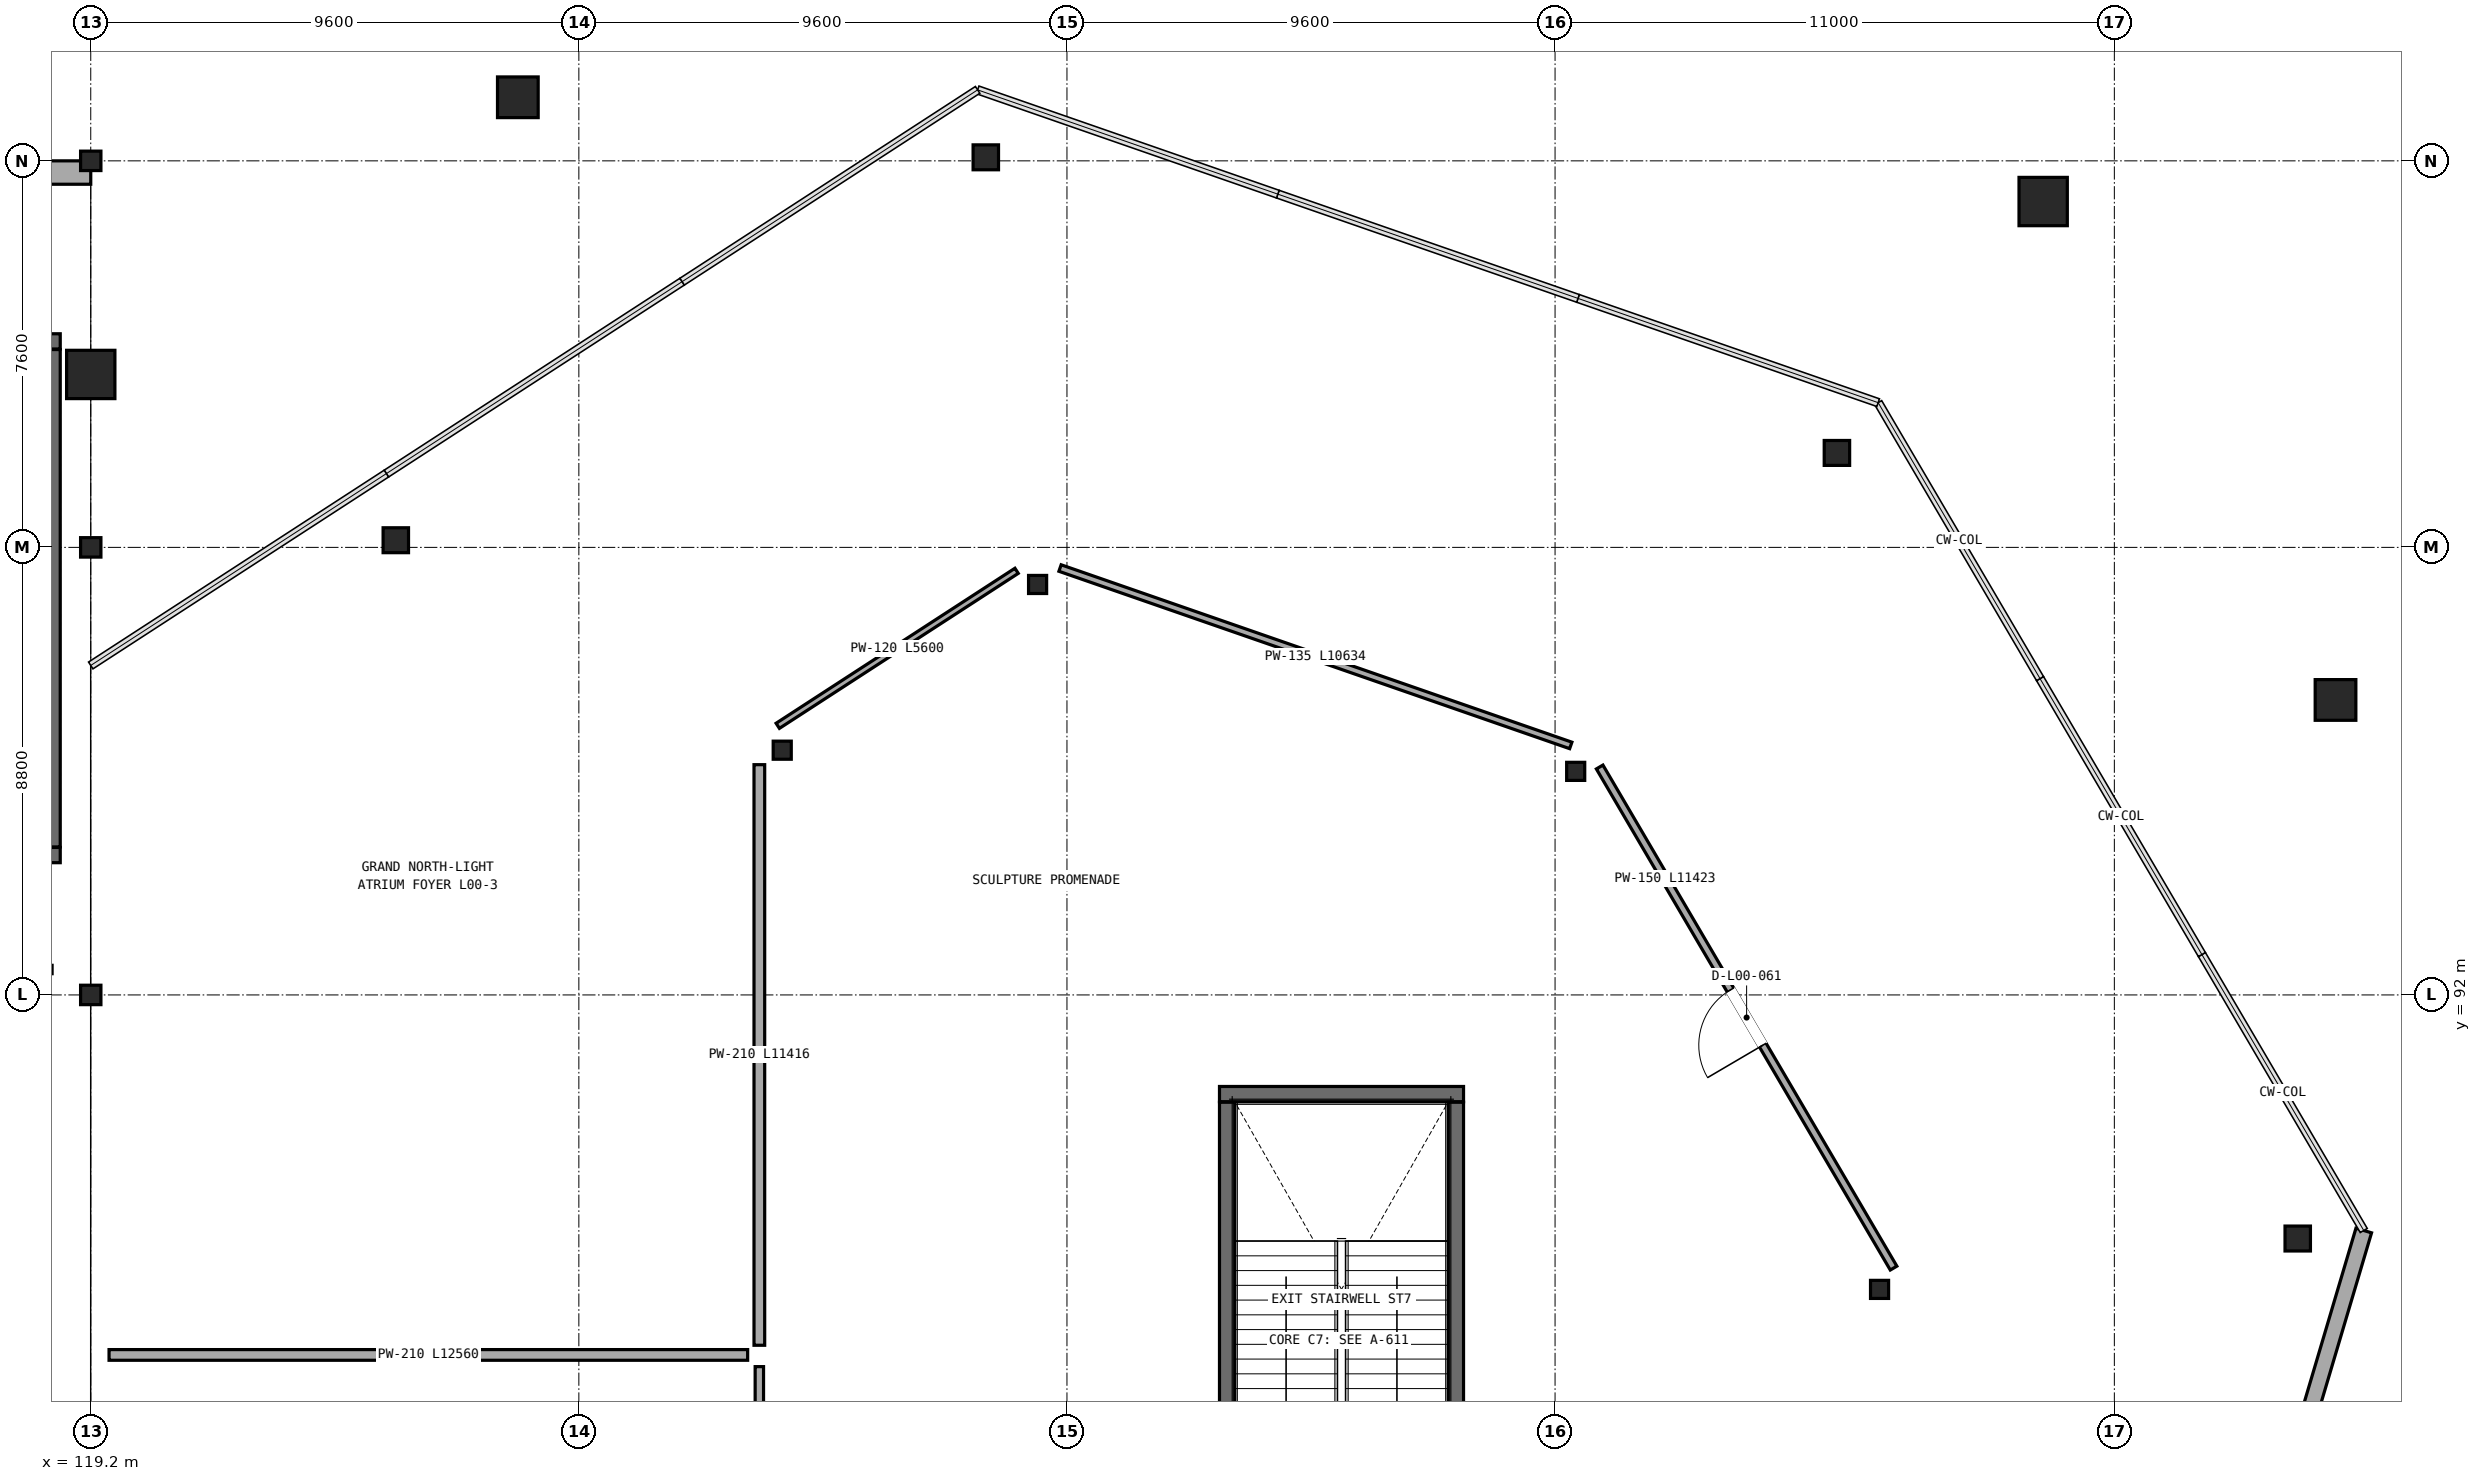
"""IFC4 building model, lengths in metres.
Left out: names, types, materials, properties, quantities, classifications, styles, units other than length and angle.
Written with IfcOpenShell. Run it as: python <this file> out.ifc"""

import sys

from ifc_helpers import new_model, si_unit, direction, frame, frame_2d, origin, origin_2d, place, context, subcontext, project, spatial, rectangle, circle, hollow_circle, i_section, extrude, element, fill, save


model = new_model("IFC4")
c1 = context("Model", 3, precision=1e-05, world=origin(), true_north=direction((0.0, 1.0)))
c2 = subcontext(c1, "Body", "Model", "MODEL_VIEW")
j1 = project(units=[si_unit("LENGTHUNIT", "METRE"), si_unit("PLANEANGLEUNIT", "RADIAN")], contexts=[c1])
p1 = place(None, origin())
s1 = spatial("IfcSite", under=j1, at=p1, CompositionType="ELEMENT")
p2 = place(p1, origin())
s2 = spatial("IfcBuilding", under=s1, at=p2, CompositionType="ELEMENT")
p3 = place(p2, origin())
s3 = spatial("IfcBuildingStorey", under=s2, at=p3, CompositionType="ELEMENT", Elevation=0.0)
for number, where, z_axis, x_axis in (
    (1, (119.2, 92.0, 0.0), (0.0, 0.0, 1.0), (1.0, 0.0, 0.0)),
    (2, (119.2, 100.8, 0.0), (0.0, 0.0, 1.0), (1.0, 0.0, 0.0)),
    (3, (119.2, 108.4, 0.0), (0.0, 0.0, 1.0), (1.0, 0.0, 0.0)),
):
    element("IfcColumn", number, at=place(p3, frame(where, z_axis=z_axis, x_axis=x_axis)), inside=s3, PredefinedType="COLUMN", context=c2, shape_type="SweptSolid", body=[
        extrude(i_section(OverallWidth=0.4, OverallDepth=0.382, WebThickness=0.025, FlangeThickness=0.036, at=origin_2d()), origin(), (0.0, 0.0, 1.0), 5.6),
    ])
p4 = place(p3, frame((163.35, 97.8, 0.0), z_axis=(0.0, 0.0, 1.0), x_axis=(1.0, 0.0, 0.0)))
e4 = element("IfcColumn", 4, at=p4, inside=s3, PredefinedType="COLUMN", context=c2, shape_type="SweptSolid", body=[
    extrude(circle(Radius=0.4, at=origin_2d()), origin(), (0.0, 0.0, 1.0), 5.56),
])
p5 = place(p3, frame((162.607, 87.21, 0.0), z_axis=(0.0, 0.0, 1.0), x_axis=(1.0, 0.0, 0.0)))
e5 = element("IfcColumn", 5, at=p5, inside=s3, PredefinedType="COLUMN", context=c2, shape_type="SweptSolid", body=[
    extrude(i_section(OverallWidth=0.5, OverallDepth=0.49, WebThickness=0.028, FlangeThickness=0.04, at=origin_2d()), origin(), (0.0, 0.0, 1.0), 5.6),
])
p6 = place(p3, frame((154.382, 86.21, 0.0), z_axis=(0.0, 0.0, 1.0), x_axis=(1.0, 0.0, 0.0)))
e6 = element("IfcColumn", 6, at=p6, inside=s3, PredefinedType="COLUMN", context=c2, shape_type="SweptSolid", body=[
    extrude(hollow_circle(Radius=0.178, WallThickness=0.013, at=origin_2d()), origin(), (0.0, 0.0, 1.0), 5.6),
])
p7 = place(p3, frame((157.6, 107.6, 0.0), z_axis=(0.0, 0.0, 1.0), x_axis=(1.0, 0.0, 0.0)))
e7 = element("IfcColumn", 7, at=p7, inside=s3, PredefinedType="COLUMN", context=c2, shape_type="SweptSolid", body=[
    extrude(circle(Radius=0.475, at=origin_2d()), origin(), (0.0, 0.0, 1.0), 5.56),
])
p8 = place(p3, frame((153.544, 102.657, 0.0), z_axis=(0.0, 0.0, 1.0), x_axis=(1.0, 0.0, 0.0)))
e8 = element("IfcColumn", 8, at=p8, inside=s3, PredefinedType="COLUMN", context=c2, shape_type="SweptSolid", body=[
    extrude(i_section(OverallWidth=0.5, OverallDepth=0.49, WebThickness=0.028, FlangeThickness=0.04, at=origin_2d()), origin(), (0.0, 0.0, 1.0), 5.6),
])
p9 = place(p3, frame((148.406, 96.396, 0.0), z_axis=(0.0, 0.0, 1.0), x_axis=(1.0, 0.0, 0.0)))
e9 = element("IfcColumn", 9, at=p9, inside=s3, PredefinedType="COLUMN", context=c2, shape_type="SweptSolid", body=[
    extrude(hollow_circle(Radius=0.178, WallThickness=0.013, at=origin_2d()), origin(), (0.0, 0.0, 1.0), 5.6),
])
p10 = place(p3, frame((127.6, 109.65, 0.0), z_axis=(0.0, 0.0, 1.0), x_axis=(1.0, 0.0, 0.0)))
e10 = element("IfcColumn", 10, at=p10, inside=s3, PredefinedType="COLUMN", context=c2, shape_type="SweptSolid", body=[
    extrude(circle(Radius=0.4, at=origin_2d()), origin(), (0.0, 0.0, 1.0), 5.56),
])
p11 = place(p3, frame((136.804, 108.469, 0.0), z_axis=(0.0, 0.0, 1.0), x_axis=(1.0, 0.0, 0.0)))
e11 = element("IfcColumn", 11, at=p11, inside=s3, PredefinedType="COLUMN", context=c2, shape_type="SweptSolid", body=[
    extrude(i_section(OverallWidth=0.5, OverallDepth=0.49, WebThickness=0.028, FlangeThickness=0.04, at=origin_2d()), origin(), (0.0, 0.0, 1.0), 5.6),
])
p12 = place(p3, frame((137.823, 100.071, 0.0), z_axis=(0.0, 0.0, 1.0), x_axis=(1.0, 0.0, 0.0)))
e12 = element("IfcColumn", 12, at=p12, inside=s3, PredefinedType="COLUMN", context=c2, shape_type="SweptSolid", body=[
    extrude(hollow_circle(Radius=0.178, WallThickness=0.013, at=origin_2d()), origin(), (0.0, 0.0, 1.0), 5.6),
])
p13 = place(p3, frame((119.2, 104.2, 0.0), z_axis=(0.0, 0.0, 1.0), x_axis=(1.0, 0.0, 0.0)))
e13 = element("IfcColumn", 13, at=p13, inside=s3, PredefinedType="COLUMN", context=c2, shape_type="SweptSolid", body=[
    extrude(circle(Radius=0.475, at=origin_2d()), origin(), (0.0, 0.0, 1.0), 5.56),
])
p14 = place(p3, frame((125.2, 100.941, 0.0), z_axis=(0.0, 0.0, 1.0), x_axis=(1.0, 0.0, 0.0)))
e14 = element("IfcColumn", 14, at=p14, inside=s3, PredefinedType="COLUMN", context=c2, shape_type="SweptSolid", body=[
    extrude(i_section(OverallWidth=0.5, OverallDepth=0.49, WebThickness=0.028, FlangeThickness=0.04, at=origin_2d()), origin(), (0.0, 0.0, 1.0), 5.6),
])
p15 = place(p3, frame((132.8, 96.812, 0.0), z_axis=(0.0, 0.0, 1.0), x_axis=(1.0, 0.0, 0.0)))
e15 = element("IfcColumn", 15, at=p15, inside=s3, PredefinedType="COLUMN", context=c2, shape_type="SweptSolid", body=[
    extrude(hollow_circle(Radius=0.178, WallThickness=0.013, at=origin_2d()), origin(), (0.0, 0.0, 1.0), 5.6),
])
p16 = place(p3, frame((159.394, 72.173, 0.0), z_axis=(0.0, 0.0, 1.0), x_axis=(0.284596961448, 0.958647260224, 0.0)))
e16 = element("IfcWall", 16, at=p16, inside=s3, PredefinedType="STANDARD", context=c2, shape_type="SweptSolid", body=[
    extrude(rectangle(XDim=15.851, YDim=0.32, at=frame_2d((7.926, 0.0))), origin(), (0.0, 0.0, 1.0), 5.29),
])
p17 = place(p16, frame((2.4, 0.0, 0.0)))
e17 = element("IfcOpeningElement", 17, at=p17, cuts=e16, PredefinedType="OPENING", context=c2, shape_type="SweptSolid", body=[
    extrude(rectangle(XDim=2.5, YDim=2.55, at=frame_2d((1.25, 1.275))), frame((0.0, 0.17, 0.0), z_axis=(0.0, -1.0, 0.0), x_axis=(1.0, 0.0, 0.0)), (0.0, 0.0, 1.0), 0.34),
])
p18 = place(p16, frame((9.2, 0.0, 0.0)))
e18 = element("IfcOpeningElement", 18, at=p18, cuts=e16, PredefinedType="OPENING", context=c2, shape_type="SweptSolid", body=[
    extrude(rectangle(XDim=2.5, YDim=2.55, at=frame_2d((1.25, 1.275))), frame((0.0, 0.17, 0.0), z_axis=(0.0, -1.0, 0.0), x_axis=(1.0, 0.0, 0.0)), (0.0, 0.0, 1.0), 0.34),
])
p19 = place(p3, frame((119.2, 108.17, 0.0), z_axis=(0.0, 0.0, 1.0), x_axis=(-1.0, 0.0, 0.0)))
e19 = element("IfcWall", 19, at=p19, inside=s3, PredefinedType="SOLIDWALL", context=c2, shape_type="SweptSolid", body=[
    extrude(rectangle(XDim=38.4, YDim=0.46, at=frame_2d((19.2, 0.0))), origin(), (0.0, 0.0, 1.0), 4.653),
])
p20 = place(p19, frame((32.375, 0.0, 0.0)))
e20 = element("IfcOpeningElement", 20, at=p20, cuts=e19, PredefinedType="OPENING", context=c2, shape_type="SweptSolid", body=[
    extrude(rectangle(XDim=2.45, YDim=2.5, at=frame_2d((1.225, 1.25))), frame((0.0, 0.24, 0.0), z_axis=(0.0, -1.0, 0.0), x_axis=(1.0, 0.0, 0.0)), (0.0, 0.0, 1.0), 0.48),
])
p21 = place(p19, frame((22.8, 0.0, 0.0)))
e21 = element("IfcOpeningElement", 21, at=p21, cuts=e19, PredefinedType="OPENING", context=c2, shape_type="SweptSolid", body=[
    extrude(rectangle(XDim=2.4, YDim=2.45, at=frame_2d((1.2, 1.225))), frame((0.0, 0.24, 0.0), z_axis=(0.0, -1.0, 0.0), x_axis=(1.0, 0.0, 0.0)), (0.0, 0.0, 1.0), 0.48),
])
p22 = place(p19, frame((13.25, 0.0, 0.0)))
e22 = element("IfcOpeningElement", 22, at=p22, cuts=e19, PredefinedType="OPENING", context=c2, shape_type="SweptSolid", body=[
    extrude(rectangle(XDim=2.3, YDim=2.4, at=frame_2d((1.15, 1.2))), frame((0.0, 0.24, 0.0), z_axis=(0.0, -1.0, 0.0), x_axis=(1.0, 0.0, 0.0)), (0.0, 0.0, 1.0), 0.48),
])
p23 = place(p19, frame((3.55, 0.0, 0.0)))
e23 = element("IfcOpeningElement", 23, at=p23, cuts=e19, PredefinedType="OPENING", context=c2, shape_type="SweptSolid", body=[
    extrude(rectangle(XDim=2.5, YDim=2.55, at=frame_2d((1.25, 1.275))), frame((0.0, 0.24, 0.0), z_axis=(0.0, -1.0, 0.0), x_axis=(1.0, 0.0, 0.0)), (0.0, 0.0, 1.0), 0.48),
])
p24 = place(p19, frame((20.2, 0.0, 0.9)))
e24 = element("IfcOpeningElement", 24, at=p24, cuts=e19, PredefinedType="OPENING", context=c2, shape_type="SweptSolid", body=[
    extrude(rectangle(XDim=1.52, YDim=1.55, at=frame_2d((0.76, 0.775))), frame((0.0, 0.24, 0.0), z_axis=(0.0, -1.0, 0.0), x_axis=(1.0, 0.0, 0.0)), (0.0, 0.0, 1.0), 0.48),
])
p25 = place(p3, frame((110.2, 94.75, 0.0), z_axis=(0.0, 0.0, 1.0), x_axis=(1.0, 0.0, 0.0)))
e25 = element("IfcWall", 25, at=p25, inside=s3, PredefinedType="SHEAR", context=c2, shape_type="SweptSolid", body=[
    extrude(rectangle(XDim=8.4, YDim=0.3, at=frame_2d((4.2, 0.0))), origin(), (0.0, 0.0, 1.0), 5.345),
])
p26 = place(p25, frame((5.925, 0.0, 0.0)))
e26 = element("IfcOpeningElement", 26, at=p26, cuts=e25, PredefinedType="OPENING", context=c2, shape_type="SweptSolid", body=[
    extrude(rectangle(XDim=1.45, YDim=2.25, at=frame_2d((0.725, 1.125))), frame((0.0, 0.16, 0.0), z_axis=(0.0, -1.0, 0.0), x_axis=(1.0, 0.0, 0.0)), (0.0, 0.0, 1.0), 0.32),
])
p27 = place(p3, frame((118.6, 104.85, 0.0), z_axis=(0.0, 0.0, 1.0), x_axis=(-1.0, 0.0, 0.0)))
e27 = element("IfcWall", 27, at=p27, inside=s3, PredefinedType="SHEAR", context=c2, shape_type="SweptSolid", body=[
    extrude(rectangle(XDim=8.4, YDim=0.3, at=frame_2d((4.2, 0.0))), origin(), (0.0, 0.0, 1.0), 5.345),
])
p28 = place(p3, frame((118.45, 94.91, 0.0), z_axis=(0.0, 0.0, 1.0), x_axis=(0.0, 1.0, 0.0)))
e28 = element("IfcWall", 28, at=p28, inside=s3, PredefinedType="SHEAR", context=c2, shape_type="SweptSolid", body=[
    extrude(rectangle(XDim=9.78, YDim=0.3, at=frame_2d((4.89, 0.0))), origin(), (0.0, 0.0, 1.0), 5.345),
])
p29 = place(p3, frame((146.2, 90.05, 0.0), z_axis=(0.0, 0.0, 1.0), x_axis=(-1.0, 0.0, 0.0)))
e29 = element("IfcWall", 29, at=p29, inside=s3, PredefinedType="SHEAR", context=c2, shape_type="SweptSolid", body=[
    extrude(rectangle(XDim=4.8, YDim=0.3, at=frame_2d((2.4, 0.0))), origin(), (0.0, 0.0, 1.0), 5.335),
])
for number, where, z_axis, x_axis in (
    (30, (146.05, 80.51, 0.0), (0.0, 0.0, 1.0), (0.0, 1.0, 0.0)),
    (31, (141.55, 89.89, 0.0), (0.0, 0.0, 1.0), (0.0, -1.0, 0.0)),
):
    element("IfcWall", number, at=place(p3, frame(where, z_axis=z_axis, x_axis=x_axis)), inside=s3, PredefinedType="SHEAR", context=c2, shape_type="SweptSolid", body=[
        extrude(rectangle(XDim=9.38, YDim=0.3, at=frame_2d((4.69, 0.0))), origin(), (0.0, 0.0, 1.0), 5.335),
    ])
p30 = place(p3, frame((132.35, 84.692, 0.0), z_axis=(0.0, 0.0, 1.0), x_axis=(0.0, -1.0, 0.0)))
e32 = element("IfcWall", 32, at=p30, inside=s3, PredefinedType="PARTITIONING", context=c2, shape_type="SweptSolid", body=[
    extrude(rectangle(XDim=4.812, YDim=0.165, at=frame_2d((2.406, 0.0))), origin(), (0.0, 0.0, 1.0), 5.23),
])
p31 = place(p3, frame((154.658, 86.629, 0.0), z_axis=(0.0, 0.0, 1.0), x_axis=(-0.506044714384, 0.862507244633, 0.0)))
e33 = element("IfcWall", 33, at=p31, inside=s3, PredefinedType="PARTITIONING", context=c2, shape_type="SweptSolid", body=[
    extrude(rectangle(XDim=11.423, YDim=0.15, at=frame_2d((5.712, 0.0))), origin(), (0.0, 0.0, 1.0), 4.51),
])
p32 = place(p31, frame((5.082, 0.0, 0.0)))
e34 = element("IfcOpeningElement", 34, at=p32, cuts=e33, PredefinedType="OPENING", context=c2, shape_type="SweptSolid", body=[
    extrude(rectangle(XDim=1.26, YDim=2.34, at=frame_2d((0.63, 1.17))), frame((0.0, 0.085, 0.0), z_axis=(0.0, -1.0, 0.0), x_axis=(1.0, 0.0, 0.0)), (0.0, 0.0, 1.0), 0.17),
])
p33 = place(p3, frame((148.309, 96.906, 0.0), z_axis=(0.0, 0.0, 1.0), x_axis=(-0.944672280914, 0.328015672907, 0.0)))
e35 = element("IfcWall", 35, at=p33, inside=s3, PredefinedType="PARTITIONING", context=c2, shape_type="SweptSolid", body=[
    extrude(rectangle(XDim=10.634, YDim=0.135, at=frame_2d((5.317, 0.0))), origin(), (0.0, 0.0, 1.0), 5.23),
])
p34 = place(p3, frame((137.409, 100.339, 0.0), z_axis=(0.0, 0.0, 1.0), x_axis=(-0.838914477988, -0.544263262238, 0.0)))
e36 = element("IfcWall", 36, at=p34, inside=s3, PredefinedType="PARTITIONING", context=c2, shape_type="SweptSolid", body=[
    extrude(rectangle(XDim=5.6, YDim=0.12, at=frame_2d((2.8, 0.0))), origin(), (0.0, 0.0, 1.0), 5.23),
])
p35 = place(p3, frame((132.35, 96.527, 0.0), z_axis=(0.0, 0.0, 1.0), x_axis=(0.0, -1.0, 0.0)))
e37 = element("IfcWall", 37, at=p35, inside=s3, PredefinedType="PARTITIONING", context=c2, shape_type="SweptSolid", body=[
    extrude(rectangle(XDim=11.416, YDim=0.21, at=frame_2d((5.708, 0.0))), origin(), (0.0, 0.0, 1.0), 5.23),
])
p36 = place(p3, frame((119.56, 84.922, 0.0), z_axis=(0.0, 0.0, 1.0), x_axis=(1.0, 0.0, 0.0)))
e38 = element("IfcWall", 38, at=p36, inside=s3, PredefinedType="PARTITIONING", context=c2, shape_type="SweptSolid", body=[
    extrude(rectangle(XDim=12.56, YDim=0.21, at=frame_2d((6.28, 0.0))), origin(), (0.0, 0.0, 1.0), 4.61),
])
p37 = place(p32, origin())
e39 = element("IfcDoor", 39, at=p37, inside=s3, OperationType="SINGLE_SWING_LEFT", PredefinedType="DOOR", context=c2, shape_type="SweptSolid", body=[
    extrude(rectangle(XDim=1.26, YDim=2.34, at=frame_2d((0.63, 1.17))), frame((0.0, 0.025, 0.0), z_axis=(0.0, -1.0, 0.0), x_axis=(1.0, 0.0, 0.0)), (0.0, 0.0, 1.0), 0.05),
])
fill(e34, e39)
save(model, sys.argv[1])
